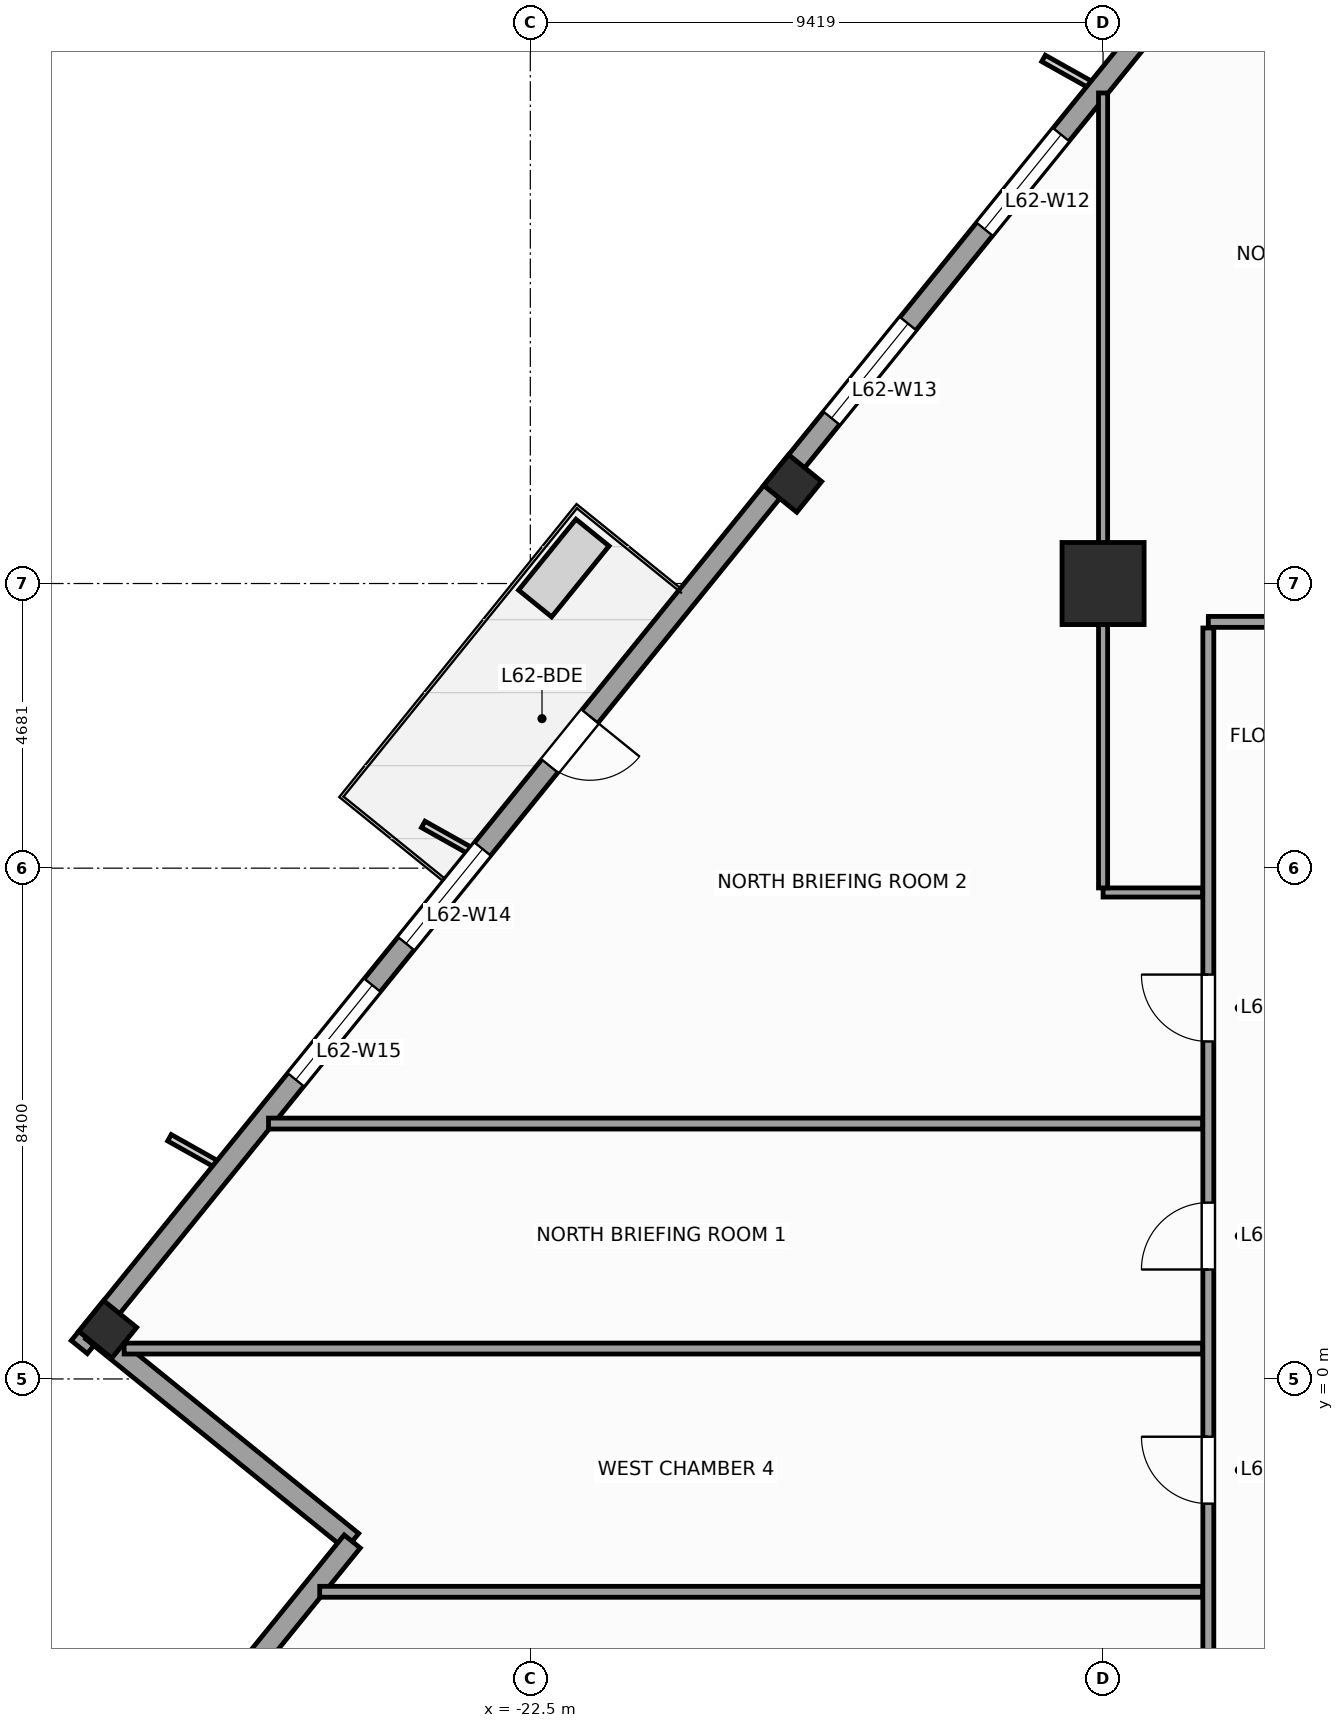
"""IFC4 building model, lengths in metres.
Left out: names, types, materials, properties, quantities, classifications, styles, units other than length and angle.
Written with IfcOpenShell. Run it as: python <this file> out.ifc"""

import sys

from ifc_helpers import new_model, si_unit, direction, frame, frame_2d, origin, origin_2d, place, context, subcontext, project, spatial, rectangle, extrude, source, transform, mapped, element, fill, save


model = new_model("IFC4")
c1 = context("Model", 3, precision=1e-05, world=origin(), true_north=direction((0.0, 1.0)))
c2 = subcontext(c1, "Body", "Model", "MODEL_VIEW")
j1 = project(units=[si_unit("LENGTHUNIT", "METRE"), si_unit("PLANEANGLEUNIT", "RADIAN")], contexts=[c1])
p1 = place(None, origin())
s1 = spatial("IfcSite", under=j1, at=p1, CompositionType="ELEMENT")
p2 = place(p1, origin())
s2 = spatial("IfcBuilding", under=s1, at=p2, CompositionType="ELEMENT")
p3 = place(p2, frame((0.0, 0.0, 256.3)))
s3 = spatial("IfcBuildingStorey", under=s2, at=p3, CompositionType="ELEMENT", Elevation=256.3)
m1 = source(origin(), c2, "Body", "SweptSolid", [
    extrude(rectangle(XDim=1.35, YDim=1.35, at=origin_2d()), origin(), (0.0, 0.0, 1.0), 3.9),
])
p4 = place(p3, frame((-13.081, 13.081, 0.0), z_axis=(0.0, 0.0, 1.0), x_axis=(1.0, 0.0, 0.0)))
e1 = element("IfcColumn", 1, at=p4, inside=s3, PredefinedType="COLUMN", context=c2, shape_type="MappedRepresentation", body=[
    mapped(m1, transform((0.0, 0.0, 0.0), scale=1.0)),
])
m2 = source(origin(), c2, "Body", "SweptSolid", [
    extrude(rectangle(XDim=0.65, YDim=0.7, at=origin_2d()), origin(), (0.0, 0.0, 1.0), 3.9),
])
for number, where, z_axis, x_axis in (
    (2, (-18.185, 14.726, 0.0), (0.0, 0.0, 1.0), (0.629, 0.777, 0.0)),
    (3, (-29.45, 0.815, 0.0), (0.0, 0.0, 1.0), (0.629, 0.777, 0.0)),
):
    element("IfcColumn", number, at=place(p3, frame(where, z_axis=z_axis, x_axis=x_axis)), inside=s3, PredefinedType="COLUMN", context=c2, shape_type="MappedRepresentation", body=[
        mapped(m2, transform((0.0, 0.0, 0.0), scale=1.0)),
    ])
p5 = place(p3, frame((-6.733, 29.154, 0.0), z_axis=(0.0, 0.0, 1.0), x_axis=(-0.629325378072, -0.77714192302, 0.0)))
e4 = element("IfcWall", 4, at=p5, inside=s3, PredefinedType="STANDARD", context=c2, shape_type="SweptSolid", body=[
    extrude(rectangle(XDim=36.84, YDim=0.34, at=frame_2d((18.42, 0.0))), origin(), (0.0, 0.0, 1.0), 2.02),
])
p6 = place(p5, frame((23.495, 0.0, 0.0)))
e5 = element("IfcOpeningElement", 5, at=p6, cuts=e4, PredefinedType="OPENING", context=c2, shape_type="SweptSolid", body=[
    extrude(rectangle(XDim=1.05, YDim=2.02, at=frame_2d((0.525, 1.01))), frame((0.0, 0.18, 0.0), z_axis=(0.0, -1.0, 0.0), x_axis=(1.0, 0.0, 0.0)), (0.0, 0.0, 1.0), 0.36),
])
p7 = place(p5, frame((3.421, 0.0, 0.49)))
e6 = element("IfcOpeningElement", 6, at=p7, cuts=e4, PredefinedType="OPENING", context=c2, shape_type="SweptSolid", body=[
    extrude(rectangle(XDim=2.0, YDim=1.45, at=frame_2d((1.0, 0.725))), frame((0.0, 0.18, 0.0), z_axis=(0.0, -1.0, 0.0), x_axis=(1.0, 0.0, 0.0)), (0.0, 0.0, 1.0), 0.36),
])
p8 = place(p5, frame((11.184, 0.0, 0.49)))
e7 = element("IfcOpeningElement", 7, at=p8, cuts=e4, PredefinedType="OPENING", context=c2, shape_type="SweptSolid", body=[
    extrude(rectangle(XDim=2.0, YDim=1.45, at=frame_2d((1.0, 0.725))), frame((0.0, 0.18, 0.0), z_axis=(0.0, -1.0, 0.0), x_axis=(1.0, 0.0, 0.0)), (0.0, 0.0, 1.0), 0.36),
])
p9 = place(p5, frame((15.183, 0.0, 0.49)))
e8 = element("IfcOpeningElement", 8, at=p9, cuts=e4, PredefinedType="OPENING", context=c2, shape_type="SweptSolid", body=[
    extrude(rectangle(XDim=2.0, YDim=1.45, at=frame_2d((1.0, 0.725))), frame((0.0, 0.18, 0.0), z_axis=(0.0, -1.0, 0.0), x_axis=(1.0, 0.0, 0.0)), (0.0, 0.0, 1.0), 0.36),
])
p10 = place(p5, frame((26.301, 0.0, 0.49)))
e9 = element("IfcOpeningElement", 9, at=p10, cuts=e4, PredefinedType="OPENING", context=c2, shape_type="SweptSolid", body=[
    extrude(rectangle(XDim=2.0, YDim=1.45, at=frame_2d((1.0, 0.725))), frame((0.0, 0.18, 0.0), z_axis=(0.0, -1.0, 0.0), x_axis=(1.0, 0.0, 0.0)), (0.0, 0.0, 1.0), 0.36),
])
p11 = place(p5, frame((29.182, 0.0, 0.49)))
e10 = element("IfcOpeningElement", 10, at=p11, cuts=e4, PredefinedType="OPENING", context=c2, shape_type="SweptSolid", body=[
    extrude(rectangle(XDim=2.0, YDim=1.45, at=frame_2d((1.0, 0.725))), frame((0.0, 0.18, 0.0), z_axis=(0.0, -1.0, 0.0), x_axis=(1.0, 0.0, 0.0)), (0.0, 0.0, 1.0), 0.36),
])
p12 = place(p3, frame((-29.703, 0.789, 0.0), z_axis=(0.0, 0.0, 1.0), x_axis=(0.77714355312, -0.629323365087, 0.0)))
e11 = element("IfcWall", 11, at=p12, inside=s3, PredefinedType="STANDARD", context=c2, shape_type="SweptSolid", body=[
    extrude(rectangle(XDim=5.5, YDim=0.34, at=frame_2d((2.75, 0.0))), origin(), (0.0, 0.0, 1.0), 3.5),
])
p13 = place(p3, frame((-25.429, -2.673, 0.0), z_axis=(0.0, 0.0, 1.0), x_axis=(-0.629299794138, -0.777162640055, 0.0)))
e12 = element("IfcWall", 12, at=p13, inside=s3, PredefinedType="STANDARD", context=c2, shape_type="SweptSolid", body=[
    extrude(rectangle(XDim=5.67, YDim=0.34, at=frame_2d((2.835, 0.0))), origin(), (0.0, 0.0, 1.0), 2.02),
])
p14 = place(p3, frame((-11.35, 12.45, 0.0), z_axis=(0.0, 0.0, 1.0), x_axis=(1.0, 0.0, 0.0)))
e13 = element("IfcWall", 13, at=p14, inside=s3, PredefinedType="PARTITIONING", context=c2, shape_type="SweptSolid", body=[
    extrude(rectangle(XDim=21.65, YDim=0.18, at=frame_2d((10.825, 0.0))), origin(), (0.0, 0.0, 1.0), 2.46),
])
p15 = place(p14, frame((2.689, 0.0, 0.0)))
e14 = element("IfcOpeningElement", 14, at=p15, cuts=e13, PredefinedType="OPENING", context=c2, shape_type="SweptSolid", body=[
    extrude(rectangle(XDim=1.1, YDim=2.2, at=frame_2d((0.55, 1.1))), frame((0.0, 0.1, 0.0), z_axis=(0.0, -1.0, 0.0), x_axis=(1.0, 0.0, 0.0)), (0.0, 0.0, 1.0), 0.2),
])
p16 = place(p14, frame((8.2, 0.0, 0.0)))
e15 = element("IfcOpeningElement", 15, at=p16, cuts=e13, PredefinedType="OPENING", context=c2, shape_type="SweptSolid", body=[
    extrude(rectangle(XDim=1.1, YDim=2.2, at=frame_2d((0.55, 1.1))), frame((0.0, 0.1, 0.0), z_axis=(0.0, -1.0, 0.0), x_axis=(1.0, 0.0, 0.0)), (0.0, 0.0, 1.0), 0.2),
])
p17 = place(p14, frame((13.4, 0.0, 0.0)))
e16 = element("IfcOpeningElement", 16, at=p17, cuts=e13, PredefinedType="OPENING", context=c2, shape_type="SweptSolid", body=[
    extrude(rectangle(XDim=1.1, YDim=2.2, at=frame_2d((0.55, 1.1))), frame((0.0, 0.1, 0.0), z_axis=(0.0, -1.0, 0.0), x_axis=(1.0, 0.0, 0.0)), (0.0, 0.0, 1.0), 0.2),
])
p18 = place(p14, frame((18.385, 0.0, 0.0)))
e17 = element("IfcOpeningElement", 17, at=p18, cuts=e13, PredefinedType="OPENING", context=c2, shape_type="SweptSolid", body=[
    extrude(rectangle(XDim=1.1, YDim=2.2, at=frame_2d((0.55, 1.1))), frame((0.0, 0.1, 0.0), z_axis=(0.0, -1.0, 0.0), x_axis=(1.0, 0.0, 0.0)), (0.0, 0.0, 1.0), 0.2),
])
p19 = place(p3, frame((-11.35, -11.3, 0.0), z_axis=(0.0, 0.0, 1.0), x_axis=(0.0, 1.0, 0.0)))
e18 = element("IfcWall", 18, at=p19, inside=s3, PredefinedType="PARTITIONING", context=c2, shape_type="SweptSolid", body=[
    extrude(rectangle(XDim=23.65, YDim=0.18, at=frame_2d((11.825, 0.0))), origin(), (0.0, 0.0, 1.0), 3.5),
])
p20 = place(p19, frame((13.1, 0.0, 0.0)))
e19 = element("IfcOpeningElement", 19, at=p20, cuts=e18, PredefinedType="OPENING", context=c2, shape_type="SweptSolid", body=[
    extrude(rectangle(XDim=1.1, YDim=2.2, at=frame_2d((0.55, 1.1))), frame((0.0, 0.1, 0.0), z_axis=(0.0, -1.0, 0.0), x_axis=(1.0, 0.0, 0.0)), (0.0, 0.0, 1.0), 0.2),
])
p21 = place(p19, frame((16.85, 0.0, 0.0)))
e20 = element("IfcOpeningElement", 20, at=p21, cuts=e18, PredefinedType="OPENING", context=c2, shape_type="SweptSolid", body=[
    extrude(rectangle(XDim=1.1, YDim=2.2, at=frame_2d((0.55, 1.1))), frame((0.0, 0.1, 0.0), z_axis=(0.0, -1.0, 0.0), x_axis=(1.0, 0.0, 0.0)), (0.0, 0.0, 1.0), 0.2),
])
p22 = place(p19, frame((5.0, 0.0, 0.0)))
e21 = element("IfcOpeningElement", 21, at=p22, cuts=e18, PredefinedType="OPENING", context=c2, shape_type="SweptSolid", body=[
    extrude(rectangle(XDim=1.1, YDim=2.2, at=frame_2d((0.55, 1.1))), frame((0.0, 0.1, 0.0), z_axis=(0.0, -1.0, 0.0), x_axis=(1.0, 0.0, 0.0)), (0.0, 0.0, 1.0), 0.2),
])
p23 = place(p19, frame((9.25, 0.0, 0.0)))
e22 = element("IfcOpeningElement", 22, at=p23, cuts=e18, PredefinedType="OPENING", context=c2, shape_type="SweptSolid", body=[
    extrude(rectangle(XDim=1.1, YDim=2.2, at=frame_2d((0.55, 1.1))), frame((0.0, 0.1, 0.0), z_axis=(0.0, -1.0, 0.0), x_axis=(1.0, 0.0, 0.0)), (0.0, 0.0, 1.0), 0.2),
])
p24 = place(p3, frame((-11.445, -3.5, 0.0), z_axis=(0.0, 0.0, 1.0), x_axis=(-1.0, 0.0, 0.0)))
e23 = element("IfcWall", 23, at=p24, inside=s3, PredefinedType="PARTITIONING", context=c2, shape_type="SweptSolid", body=[
    extrude(rectangle(XDim=14.519, YDim=0.18, at=frame_2d((7.259, 0.0))), origin(), (0.0, 0.0, 1.0), 3.5),
])
p25 = place(p3, frame((-11.445, 0.5, 0.0), z_axis=(0.0, 0.0, 1.0), x_axis=(-1.0, 0.0, 0.0)))
e24 = element("IfcWall", 24, at=p25, inside=s3, PredefinedType="PARTITIONING", context=c2, shape_type="SweptSolid", body=[
    extrude(rectangle(XDim=17.735, YDim=0.18, at=frame_2d((8.867, 0.0))), origin(), (0.0, 0.0, 1.0), 3.5),
])
p26 = place(p3, frame((-11.445, 4.2, 0.0), z_axis=(0.0, 0.0, 1.0), x_axis=(-1.0, 0.0, 0.0)))
e25 = element("IfcWall", 25, at=p26, inside=s3, PredefinedType="PARTITIONING", context=c2, shape_type="SweptSolid", body=[
    extrude(rectangle(XDim=15.361, YDim=0.18, at=frame_2d((7.68, 0.0))), origin(), (0.0, 0.0, 1.0), 3.5),
])
p27 = place(p3, frame((-11.445, 8.0, 0.0), z_axis=(0.0, 0.0, 1.0), x_axis=(-1.0, 0.0, 0.0)))
e26 = element("IfcWall", 26, at=p27, inside=s3, PredefinedType="PARTITIONING", context=c2, shape_type="SweptSolid", body=[
    extrude(rectangle(XDim=1.636, YDim=0.15, at=frame_2d((0.818, 0.0))), origin(), (0.0, 0.0, 1.0), 3.5),
])
p28 = place(p3, frame((-13.081, 8.075, 0.0), z_axis=(0.0, 0.0, 1.0), x_axis=(0.0, 1.0, 0.0)))
e27 = element("IfcWall", 27, at=p28, inside=s3, PredefinedType="PARTITIONING", context=c2, shape_type="SweptSolid", body=[
    extrude(rectangle(XDim=13.073, YDim=0.15, at=frame_2d((6.537, 0.0))), origin(), (0.0, 0.0, 1.0), 2.02),
])
m3 = source(origin(), c2, "Body", "SweptSolid", [
    extrude(rectangle(XDim=1.05, YDim=2.02, at=frame_2d((0.525, 1.01))), frame((0.0, 0.025, 0.0), z_axis=(0.0, -1.0, 0.0), x_axis=(1.0, 0.0, 0.0)), (0.0, 0.0, 1.0), 0.05),
])
p29 = place(p6, origin())
e28 = element("IfcDoor", 28, at=p29, inside=s3, OperationType="SINGLE_SWING_LEFT", PredefinedType="DOOR", context=c2, shape_type="MappedRepresentation", body=[
    mapped(m3, transform((0.0, 0.0, 0.0), scale=1.0)),
])
fill(e5, e28)
m4 = source(origin(), c2, "Body", "SweptSolid", [
    extrude(rectangle(XDim=2.0, YDim=1.45, at=frame_2d((1.0, 0.725))), frame((0.0, 0.03, 0.0), z_axis=(0.0, -1.0, 0.0), x_axis=(1.0, 0.0, 0.0)), (0.0, 0.0, 1.0), 0.06),
])
p30 = place(p8, origin())
e29 = element("IfcWindow", 29, at=p30, inside=s3, PartitioningType="SINGLE_PANEL", PredefinedType="WINDOW", context=c2, shape_type="MappedRepresentation", body=[
    mapped(m4, transform((0.0, 0.0, 0.0), scale=1.0)),
])
fill(e7, e29)
p31 = place(p9, origin())
e30 = element("IfcWindow", 30, at=p31, inside=s3, PartitioningType="SINGLE_PANEL", PredefinedType="WINDOW", context=c2, shape_type="MappedRepresentation", body=[
    mapped(m4, transform((0.0, 0.0, 0.0), scale=1.0)),
])
fill(e8, e30)
p32 = place(p10, origin())
e31 = element("IfcWindow", 31, at=p32, inside=s3, PartitioningType="SINGLE_PANEL", PredefinedType="WINDOW", context=c2, shape_type="MappedRepresentation", body=[
    mapped(m4, transform((0.0, 0.0, 0.0), scale=1.0)),
])
fill(e9, e31)
p33 = place(p11, origin())
e32 = element("IfcWindow", 32, at=p33, inside=s3, PartitioningType="SINGLE_PANEL", PredefinedType="WINDOW", context=c2, shape_type="MappedRepresentation", body=[
    mapped(m4, transform((0.0, 0.0, 0.0), scale=1.0)),
])
fill(e10, e32)
m5 = source(origin(), c2, "Body", "SweptSolid", [
    extrude(rectangle(XDim=1.1, YDim=2.2, at=frame_2d((0.55, 1.1))), frame((0.0, 0.025, 0.0), z_axis=(0.0, -1.0, 0.0), x_axis=(1.0, 0.0, 0.0)), (0.0, 0.0, 1.0), 0.05),
])
p34 = place(p20, origin())
e33 = element("IfcDoor", 33, at=p34, inside=s3, OperationType="SINGLE_SWING_LEFT", PredefinedType="DOOR", context=c2, shape_type="MappedRepresentation", body=[
    mapped(m5, transform((0.0, 0.0, 0.0), scale=1.0)),
])
fill(e19, e33)
p35 = place(p21, origin())
e34 = element("IfcDoor", 34, at=p35, inside=s3, OperationType="SINGLE_SWING_RIGHT", PredefinedType="DOOR", context=c2, shape_type="MappedRepresentation", body=[
    mapped(m5, transform((0.0, 0.0, 0.0), scale=1.0)),
])
fill(e20, e34)
p36 = place(p23, origin())
e35 = element("IfcDoor", 35, at=p36, inside=s3, OperationType="SINGLE_SWING_RIGHT", PredefinedType="DOOR", context=c2, shape_type="MappedRepresentation", body=[
    mapped(m5, transform((0.0, 0.0, 0.0), scale=1.0)),
])
fill(e22, e35)
save(model, sys.argv[1])
